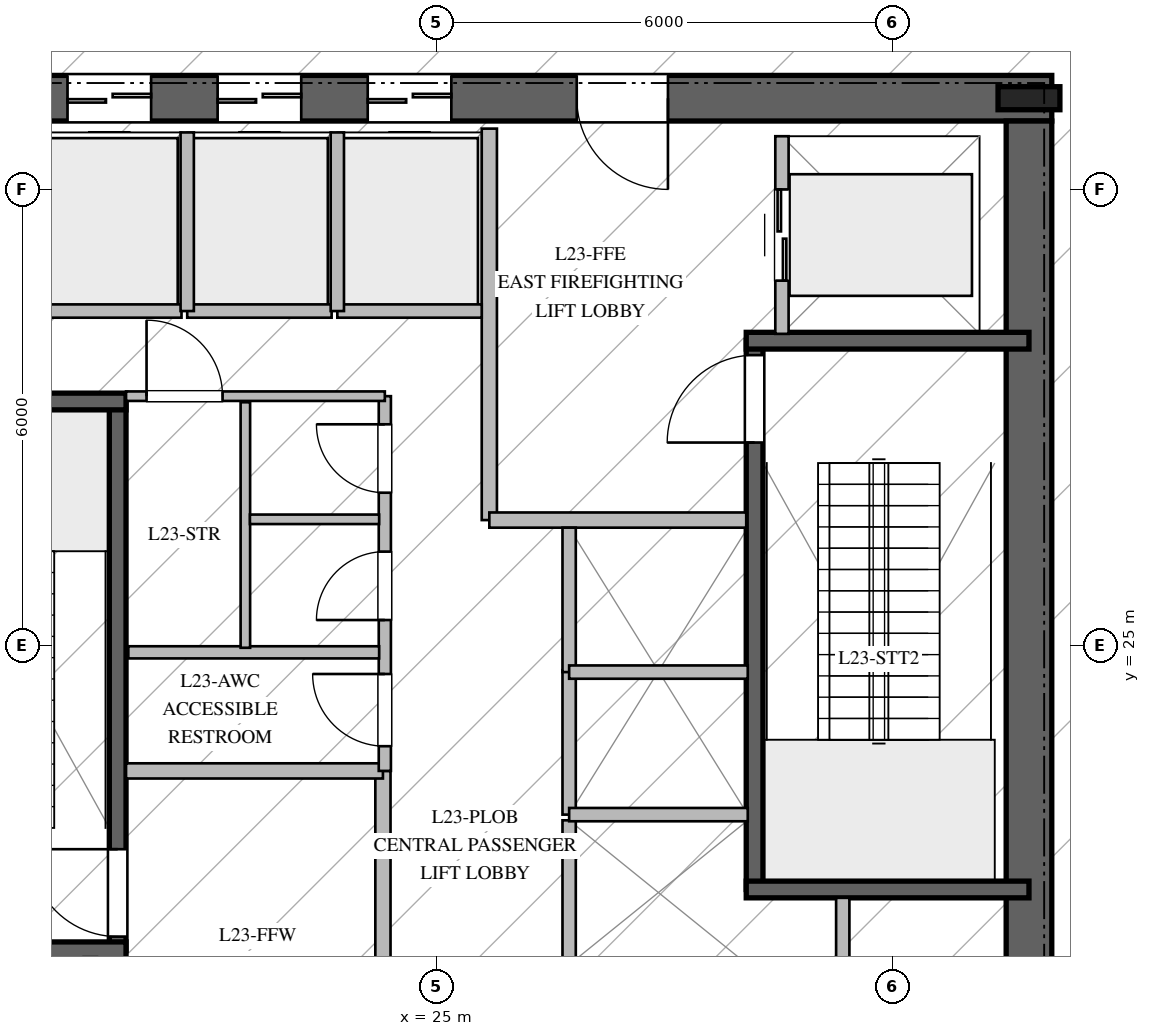
"""IFC4 building model, lengths in metres.
Left out: names, types, materials, properties, quantities, classifications, styles, units other than length and angle.
Written with IfcOpenShell. Run it as: python <this file> out.ifc"""

import sys

from ifc_helpers import new_model, si_unit, direction, frame, frame_2d, origin, origin_2d, place, context, subcontext, project, spatial, rectangle, i_section, extrude, element, fill, save


model = new_model("IFC4")
c1 = context("Model", 3, precision=1e-05, world=origin(), true_north=direction((0.0, 1.0)))
c2 = subcontext(c1, "Body", "Model", "MODEL_VIEW")
j1 = project(units=[si_unit("LENGTHUNIT", "METRE"), si_unit("PLANEANGLEUNIT", "RADIAN")], contexts=[c1])
p1 = place(None, origin())
s1 = spatial("IfcSite", under=j1, at=p1, CompositionType="ELEMENT")
p2 = place(p1, origin())
s2 = spatial("IfcBuilding", under=s1, at=p2, CompositionType="ELEMENT")
p3 = place(p2, frame((0.0, 0.0, 97.4)))
s3 = spatial("IfcBuildingStorey", under=s2, at=p3, CompositionType="ELEMENT", Elevation=97.4)
p4 = place(p3, frame((33.1, 32.2, 0.0), z_axis=(0.0, 0.0, 1.0), x_axis=(-1.0, 0.0, 0.0)))
e1 = element("IfcWall", 1, at=p4, inside=s3, PredefinedType="SHEAR", context=c2, shape_type="SweptSolid", body=[
    extrude(rectangle(XDim=16.2, YDim=0.6, at=frame_2d((8.1, 0.0))), origin(), (0.0, 0.0, 1.0), 4.76),
])
p5 = place(p4, frame((5.05, 0.0, 0.0)))
e2 = element("IfcOpeningElement", 2, at=p5, cuts=e1, PredefinedType="OPENING", context=c2, shape_type="SweptSolid", body=[
    extrude(rectangle(XDim=1.2, YDim=2.25, at=frame_2d((0.6, 1.125))), frame((0.0, 0.31, 0.0), z_axis=(0.0, -1.0, 0.0), x_axis=(1.0, 0.0, 0.0)), (0.0, 0.0, 1.0), 0.62),
])
p6 = place(p4, frame((11.85, 0.0, 0.0)))
e3 = element("IfcOpeningElement", 3, at=p6, cuts=e1, PredefinedType="OPENING", context=c2, shape_type="SweptSolid", body=[
    extrude(rectangle(XDim=1.1, YDim=2.2, at=frame_2d((0.55, 1.1))), frame((0.0, 0.31, 0.0), z_axis=(0.0, -1.0, 0.0), x_axis=(1.0, 0.0, 0.0)), (0.0, 0.0, 1.0), 0.62),
])
p7 = place(p4, frame((9.875, 0.0, 0.0)))
e4 = element("IfcOpeningElement", 4, at=p7, cuts=e1, PredefinedType="OPENING", context=c2, shape_type="SweptSolid", body=[
    extrude(rectangle(XDim=1.1, YDim=2.2, at=frame_2d((0.55, 1.1))), frame((0.0, 0.31, 0.0), z_axis=(0.0, -1.0, 0.0), x_axis=(1.0, 0.0, 0.0)), (0.0, 0.0, 1.0), 0.62),
])
p8 = place(p4, frame((7.9, 0.0, 0.0)))
e5 = element("IfcOpeningElement", 5, at=p8, cuts=e1, PredefinedType="OPENING", context=c2, shape_type="SweptSolid", body=[
    extrude(rectangle(XDim=1.1, YDim=2.2, at=frame_2d((0.55, 1.1))), frame((0.0, 0.31, 0.0), z_axis=(0.0, -1.0, 0.0), x_axis=(1.0, 0.0, 0.0)), (0.0, 0.0, 1.0), 0.62),
])
p9 = place(p3, frame((32.8, 18.1, 0.0), z_axis=(0.0, 0.0, 1.0), x_axis=(0.0, 1.0, 0.0)))
e6 = element("IfcWall", 6, at=p9, inside=s3, PredefinedType="SHEAR", context=c2, shape_type="SweptSolid", body=[
    extrude(rectangle(XDim=13.8, YDim=0.6, at=frame_2d((6.9, 0.0))), origin(), (0.0, 0.0, 1.0), 4.76),
])
p10 = place(p3, frame((32.8, 32.2, 0.0), z_axis=(0.0, 0.0, 1.0), x_axis=(1.0, 0.0, 0.0)))
e7 = element("IfcColumn", 7, at=p10, inside=s3, PredefinedType="COLUMN", context=c2, shape_type="SweptSolid", body=[
    extrude(i_section(OverallWidth=0.303, OverallDepth=0.814, WebThickness=0.021, FlangeThickness=0.04, at=origin_2d()), origin(), (0.0, 0.0, 1.0), 5.0),
])
p11 = place(p3, frame((20.81, 20.99, 0.0), z_axis=(0.0, 0.0, 1.0), x_axis=(0.0, 1.0, 0.0)))
e8 = element("IfcWall", 8, at=p11, inside=s3, PredefinedType="SOLIDWALL", context=c2, shape_type="SweptSolid", body=[
    extrude(rectangle(XDim=7.22, YDim=0.22, at=frame_2d((3.61, 0.0))), origin(), (0.0, 0.0, 1.0), 4.76),
])
p12 = place(p11, frame((0.18, 0.0, 0.0)))
e9 = element("IfcOpeningElement", 9, at=p12, cuts=e8, PredefinedType="OPENING", context=c2, shape_type="SweptSolid", body=[
    extrude(rectangle(XDim=1.15, YDim=2.2, at=frame_2d((0.575, 1.1))), frame((0.0, 0.12, 0.0), z_axis=(0.0, -1.0, 0.0), x_axis=(1.0, 0.0, 0.0)), (0.0, 0.0, 1.0), 0.24),
])
for number, where, z_axis, x_axis in (
    (10, (17.2, 20.99, 0.0), (0.0, 0.0, 1.0), (1.0, 0.0, 0.0)),
    (11, (17.2, 28.21, 0.0), (0.0, 0.0, 1.0), (1.0, 0.0, 0.0)),
):
    element("IfcWall", number, at=place(p3, frame(where, z_axis=z_axis, x_axis=x_axis)), inside=s3, PredefinedType="SOLIDWALL", context=c2, shape_type="SweptSolid", body=[
        extrude(rectangle(XDim=3.72, YDim=0.22, at=frame_2d((1.86, 0.0))), origin(), (0.0, 0.0, 1.0), 4.76),
    ])
p13 = place(p3, frame((29.19, 21.79, 0.0), z_axis=(0.0, 0.0, 1.0), x_axis=(0.0, 1.0, 0.0)))
e12 = element("IfcWall", 12, at=p13, inside=s3, PredefinedType="SOLIDWALL", context=c2, shape_type="SweptSolid", body=[
    extrude(rectangle(XDim=7.22, YDim=0.22, at=frame_2d((3.61, 0.0))), origin(), (0.0, 0.0, 1.0), 4.76),
])
p14 = place(p13, frame((5.88, 0.0, 0.0)))
e13 = element("IfcOpeningElement", 13, at=p14, cuts=e12, PredefinedType="OPENING", context=c2, shape_type="SweptSolid", body=[
    extrude(rectangle(XDim=1.15, YDim=2.2, at=frame_2d((0.575, 1.1))), frame((0.0, 0.12, 0.0), z_axis=(0.0, -1.0, 0.0), x_axis=(1.0, 0.0, 0.0)), (0.0, 0.0, 1.0), 0.24),
])
for number, where, z_axis, x_axis in (
    (14, (29.08, 21.79, 0.0), (0.0, 0.0, 1.0), (1.0, 0.0, 0.0)),
    (15, (29.08, 29.01, 0.0), (0.0, 0.0, 1.0), (1.0, 0.0, 0.0)),
):
    element("IfcWall", number, at=place(p3, frame(where, z_axis=z_axis, x_axis=x_axis)), inside=s3, PredefinedType="SOLIDWALL", context=c2, shape_type="SweptSolid", body=[
        extrude(rectangle(XDim=3.72, YDim=0.22, at=frame_2d((1.86, 0.0))), origin(), (0.0, 0.0, 1.0), 4.76),
    ])
p15 = place(p3, frame((24.3, 18.2, 0.0), z_axis=(0.0, 0.0, 1.0), x_axis=(0.0, 1.0, 0.0)))
e16 = element("IfcWall", 16, at=p15, inside=s3, PredefinedType="PARTITIONING", context=c2, shape_type="SweptSolid", body=[
    extrude(rectangle(XDim=5.15, YDim=0.2, at=frame_2d((2.575, 0.0))), origin(), (0.0, 0.0, 1.0), 4.76),
])
p16 = place(p3, frame((20.92, 23.35, 0.0), z_axis=(0.0, 0.0, 1.0), x_axis=(1.0, 0.0, 0.0)))
e17 = element("IfcWall", 17, at=p16, inside=s3, PredefinedType="PARTITIONING", context=c2, shape_type="SweptSolid", body=[
    extrude(rectangle(XDim=3.38, YDim=0.2, at=frame_2d((1.69, 0.0))), origin(), (0.0, 0.0, 1.0), 4.76),
])
p17 = place(p3, frame((25.7, 26.65, 0.0), z_axis=(0.0, 0.0, 1.0), x_axis=(0.0, 1.0, 0.0)))
e18 = element("IfcWall", 18, at=p17, inside=s3, PredefinedType="PARTITIONING", context=c2, shape_type="SweptSolid", body=[
    extrude(rectangle(XDim=5.15, YDim=0.2, at=frame_2d((2.575, 0.0))), origin(), (0.0, 0.0, 1.0), 4.76),
])
p18 = place(p3, frame((25.7, 26.65, 0.0), z_axis=(0.0, 0.0, 1.0), x_axis=(1.0, 0.0, 0.0)))
e19 = element("IfcWall", 19, at=p18, inside=s3, PredefinedType="PARTITIONING", context=c2, shape_type="SweptSolid", body=[
    extrude(rectangle(XDim=3.38, YDim=0.2, at=frame_2d((1.69, 0.0))), origin(), (0.0, 0.0, 1.0), 4.76),
])
p19 = place(p3, frame((24.325, 23.35, 0.0), z_axis=(0.0, 0.0, 1.0), x_axis=(0.0, 1.0, 0.0)))
e20 = element("IfcWall", 20, at=p19, inside=s3, PredefinedType="PLUMBINGWALL", context=c2, shape_type="SweptSolid", body=[
    extrude(rectangle(XDim=4.93, YDim=0.16, at=frame_2d((2.465, 0.0))), origin(), (0.0, 0.0, 1.0), 4.76),
])
p20 = place(p19, frame((0.325, 0.0, 0.0)))
e21 = element("IfcOpeningElement", 21, at=p20, cuts=e20, PredefinedType="OPENING", context=c2, shape_type="SweptSolid", body=[
    extrude(rectangle(XDim=0.95, YDim=2.1, at=frame_2d((0.475, 1.05))), frame((0.0, 0.09, 0.0), z_axis=(0.0, -1.0, 0.0), x_axis=(1.0, 0.0, 0.0)), (0.0, 0.0, 1.0), 0.18),
])
p21 = place(p19, frame((1.985, 0.0, 0.0)))
e22 = element("IfcOpeningElement", 22, at=p21, cuts=e20, PredefinedType="OPENING", context=c2, shape_type="SweptSolid", body=[
    extrude(rectangle(XDim=0.9, YDim=2.1, at=frame_2d((0.45, 1.05))), frame((0.0, 0.09, 0.0), z_axis=(0.0, -1.0, 0.0), x_axis=(1.0, 0.0, 0.0)), (0.0, 0.0, 1.0), 0.18),
])
p22 = place(p19, frame((3.66, 0.0, 0.0)))
e23 = element("IfcOpeningElement", 23, at=p22, cuts=e20, PredefinedType="OPENING", context=c2, shape_type="SweptSolid", body=[
    extrude(rectangle(XDim=0.9, YDim=2.1, at=frame_2d((0.45, 1.05))), frame((0.0, 0.09, 0.0), z_axis=(0.0, -1.0, 0.0), x_axis=(1.0, 0.0, 0.0)), (0.0, 0.0, 1.0), 0.18),
])
p23 = place(p3, frame((20.92, 28.28, 0.0), z_axis=(0.0, 0.0, 1.0), x_axis=(1.0, 0.0, 0.0)))
e24 = element("IfcWall", 24, at=p23, inside=s3, PredefinedType="PARTITIONING", context=c2, shape_type="SweptSolid", body=[
    extrude(rectangle(XDim=3.405, YDim=0.125, at=frame_2d((1.703, 0.0))), origin(), (0.0, 0.0, 1.0), 4.76),
])
p24 = place(p23, frame((0.27, 0.0, 0.0)))
e25 = element("IfcOpeningElement", 25, at=p24, cuts=e24, PredefinedType="OPENING", context=c2, shape_type="SweptSolid", body=[
    extrude(rectangle(XDim=1.0, YDim=2.15, at=frame_2d((0.5, 1.075))), frame((0.0, 0.073, 0.0), z_axis=(0.0, -1.0, 0.0), x_axis=(1.0, 0.0, 0.0)), (0.0, 0.0, 1.0), 0.145),
])
p25 = place(p3, frame((20.95, 24.91, 0.0), z_axis=(0.0, 0.0, 1.0), x_axis=(1.0, 0.0, 0.0)))
e26 = element("IfcWall", 26, at=p25, inside=s3, PredefinedType="PLUMBINGWALL", context=c2, shape_type="SweptSolid", body=[
    extrude(rectangle(XDim=3.3, YDim=0.16, at=frame_2d((1.65, 0.0))), origin(), (0.0, 0.0, 1.0), 4.76),
])
p26 = place(p3, frame((22.49, 24.97, 0.0), z_axis=(0.0, 0.0, 1.0), x_axis=(0.0, 1.0, 0.0)))
e27 = element("IfcWall", 27, at=p26, inside=s3, PredefinedType="PARTITIONING", context=c2, shape_type="SweptSolid", body=[
    extrude(rectangle(XDim=3.23, YDim=0.125, at=frame_2d((1.615, 0.0))), origin(), (0.0, 0.0, 1.0), 4.76),
])
p27 = place(p3, frame((22.55, 26.66, 0.0), z_axis=(0.0, 0.0, 1.0), x_axis=(1.0, 0.0, 0.0)))
e28 = element("IfcWall", 28, at=p27, inside=s3, PredefinedType="PARTITIONING", context=c2, shape_type="SweptSolid", body=[
    extrude(rectangle(XDim=1.7, YDim=0.125, at=frame_2d((0.85, 0.0))), origin(), (0.0, 0.0, 1.0), 4.76),
])
p28 = place(p3, frame((30.35, 18.2, 0.0), z_axis=(0.0, 0.0, 1.0), x_axis=(0.0, 1.0, 0.0)))
e29 = element("IfcWall", 29, at=p28, inside=s3, PredefinedType="PARTITIONING", context=c2, shape_type="SweptSolid", body=[
    extrude(rectangle(XDim=3.48, YDim=0.175, at=frame_2d((1.74, 0.0))), origin(), (0.0, 0.0, 1.0), 4.76),
])
for number, where, z_axis, x_axis in (
    (30, (19.75, 29.4, 0.0), (0.0, 0.0, 1.0), (1.0, 0.0, 0.0)),
    (31, (21.725, 29.4, 0.0), (0.0, 0.0, 1.0), (1.0, 0.0, 0.0)),
):
    element("IfcWall", number, at=place(p3, frame(where, z_axis=z_axis, x_axis=x_axis)), inside=s3, PredefinedType="PARTITIONING", context=c2, shape_type="SweptSolid", body=[
        extrude(rectangle(XDim=1.9, YDim=0.175, at=frame_2d((0.95, 0.0))), origin(), (0.0, 0.0, 1.0), 4.76),
    ])
p29 = place(p3, frame((21.725, 29.4, 0.0), z_axis=(0.0, 0.0, 1.0), x_axis=(0.0, 1.0, 0.0)))
e32 = element("IfcWall", 32, at=p29, inside=s3, PredefinedType="PARTITIONING", context=c2, shape_type="SweptSolid", body=[
    extrude(rectangle(XDim=2.35, YDim=0.175, at=frame_2d((1.175, 0.0))), origin(), (0.0, 0.0, 1.0), 4.76),
])
p30 = place(p3, frame((23.7, 29.4, 0.0), z_axis=(0.0, 0.0, 1.0), x_axis=(1.0, 0.0, 0.0)))
e33 = element("IfcWall", 33, at=p30, inside=s3, PredefinedType="PARTITIONING", context=c2, shape_type="SweptSolid", body=[
    extrude(rectangle(XDim=1.9, YDim=0.175, at=frame_2d((0.95, 0.0))), origin(), (0.0, 0.0, 1.0), 4.76),
])
p31 = place(p3, frame((23.7, 29.4, 0.0), z_axis=(0.0, 0.0, 1.0), x_axis=(0.0, 1.0, 0.0)))
e34 = element("IfcWall", 34, at=p31, inside=s3, PredefinedType="PARTITIONING", context=c2, shape_type="SweptSolid", body=[
    extrude(rectangle(XDim=2.35, YDim=0.175, at=frame_2d((1.175, 0.0))), origin(), (0.0, 0.0, 1.0), 4.76),
])
p32 = place(p3, frame((26.75, 20.8, 0.0), z_axis=(0.0, 0.0, 1.0), x_axis=(0.0, 1.0, 0.0)))
e35 = element("IfcWall", 35, at=p32, inside=s3, PredefinedType="PARTITIONING", context=c2, shape_type="SweptSolid", body=[
    extrude(rectangle(XDim=1.9, YDim=0.175, at=frame_2d((0.95, 0.0))), origin(), (0.0, 0.0, 1.0), 4.76),
])
p33 = place(p3, frame((26.75, 22.775, 0.0), z_axis=(0.0, 0.0, 1.0), x_axis=(0.0, 1.0, 0.0)))
e36 = element("IfcWall", 36, at=p33, inside=s3, PredefinedType="PARTITIONING", context=c2, shape_type="SweptSolid", body=[
    extrude(rectangle(XDim=1.9, YDim=0.175, at=frame_2d((0.95, 0.0))), origin(), (0.0, 0.0, 1.0), 4.76),
])
p34 = place(p3, frame((26.75, 22.775, 0.0), z_axis=(0.0, 0.0, 1.0), x_axis=(1.0, 0.0, 0.0)))
e37 = element("IfcWall", 37, at=p34, inside=s3, PredefinedType="PARTITIONING", context=c2, shape_type="SweptSolid", body=[
    extrude(rectangle(XDim=2.35, YDim=0.175, at=frame_2d((1.175, 0.0))), origin(), (0.0, 0.0, 1.0), 4.76),
])
p35 = place(p3, frame((26.75, 24.65, 0.0), z_axis=(0.0, 0.0, 1.0), x_axis=(0.0, 1.0, 0.0)))
e38 = element("IfcWall", 38, at=p35, inside=s3, PredefinedType="PARTITIONING", context=c2, shape_type="SweptSolid", body=[
    extrude(rectangle(XDim=1.9, YDim=0.175, at=frame_2d((0.95, 0.0))), origin(), (0.0, 0.0, 1.0), 4.76),
])
p36 = place(p3, frame((26.75, 24.65, 0.0), z_axis=(0.0, 0.0, 1.0), x_axis=(1.0, 0.0, 0.0)))
e39 = element("IfcWall", 39, at=p36, inside=s3, PredefinedType="PARTITIONING", context=c2, shape_type="SweptSolid", body=[
    extrude(rectangle(XDim=2.35, YDim=0.175, at=frame_2d((1.175, 0.0))), origin(), (0.0, 0.0, 1.0), 4.76),
])
p37 = place(p3, frame((29.55, 29.1, 0.0), z_axis=(0.0, 0.0, 1.0), x_axis=(0.0, 1.0, 0.0)))
e40 = element("IfcWall", 40, at=p37, inside=s3, PredefinedType="PARTITIONING", context=c2, shape_type="SweptSolid", body=[
    extrude(rectangle(XDim=2.6, YDim=0.175, at=frame_2d((1.3, 0.0))), origin(), (0.0, 0.0, 1.0), 4.76),
])
p38 = place(p37, frame((0.7, 0.0, 0.0)))
e41 = element("IfcOpeningElement", 41, at=p38, cuts=e40, PredefinedType="OPENING", context=c2, shape_type="SweptSolid", body=[
    extrude(rectangle(XDim=1.2, YDim=2.2, at=frame_2d((0.6, 1.1))), frame((0.0, 0.098, 0.0), z_axis=(0.0, -1.0, 0.0), x_axis=(1.0, 0.0, 0.0)), (0.0, 0.0, 1.0), 0.195),
])
p39 = place(p12, origin())
e42 = element("IfcDoor", 42, at=p39, inside=s3, OperationType="SINGLE_SWING_RIGHT", PredefinedType="DOOR", context=c2, shape_type="SweptSolid", body=[
    extrude(rectangle(XDim=1.15, YDim=2.2, at=frame_2d((0.575, 1.1))), frame((0.0, 0.025, 0.0), z_axis=(0.0, -1.0, 0.0), x_axis=(1.0, 0.0, 0.0)), (0.0, 0.0, 1.0), 0.05),
])
fill(e9, e42)
p40 = place(p14, origin())
e43 = element("IfcDoor", 43, at=p40, inside=s3, OperationType="SINGLE_SWING_LEFT", PredefinedType="DOOR", context=c2, shape_type="SweptSolid", body=[
    extrude(rectangle(XDim=1.15, YDim=2.2, at=frame_2d((0.575, 1.1))), frame((0.0, 0.025, 0.0), z_axis=(0.0, -1.0, 0.0), x_axis=(1.0, 0.0, 0.0)), (0.0, 0.0, 1.0), 0.05),
])
fill(e13, e43)
p41 = place(p5, origin())
e44 = element("IfcDoor", 44, at=p41, inside=s3, OperationType="SINGLE_SWING_LEFT", PredefinedType="DOOR", context=c2, shape_type="SweptSolid", body=[
    extrude(rectangle(XDim=1.2, YDim=2.25, at=frame_2d((0.6, 1.125))), frame((0.0, 0.025, 0.0), z_axis=(0.0, -1.0, 0.0), x_axis=(1.0, 0.0, 0.0)), (0.0, 0.0, 1.0), 0.05),
])
fill(e2, e44)
p42 = place(p20, origin())
e45 = element("IfcDoor", 45, at=p42, inside=s3, OperationType="SINGLE_SWING_RIGHT", PredefinedType="DOOR", context=c2, shape_type="SweptSolid", body=[
    extrude(rectangle(XDim=0.95, YDim=2.1, at=frame_2d((0.475, 1.05))), frame((0.0, 0.025, 0.0), z_axis=(0.0, -1.0, 0.0), x_axis=(1.0, 0.0, 0.0)), (0.0, 0.0, 1.0), 0.05),
])
fill(e21, e45)
p43 = place(p21, origin())
e46 = element("IfcDoor", 46, at=p43, inside=s3, OperationType="SINGLE_SWING_LEFT", PredefinedType="DOOR", context=c2, shape_type="SweptSolid", body=[
    extrude(rectangle(XDim=0.9, YDim=2.1, at=frame_2d((0.45, 1.05))), frame((0.0, 0.025, 0.0), z_axis=(0.0, -1.0, 0.0), x_axis=(1.0, 0.0, 0.0)), (0.0, 0.0, 1.0), 0.05),
])
fill(e22, e46)
p44 = place(p22, origin())
e47 = element("IfcDoor", 47, at=p44, inside=s3, OperationType="SINGLE_SWING_RIGHT", PredefinedType="DOOR", context=c2, shape_type="SweptSolid", body=[
    extrude(rectangle(XDim=0.9, YDim=2.1, at=frame_2d((0.45, 1.05))), frame((0.0, 0.025, 0.0), z_axis=(0.0, -1.0, 0.0), x_axis=(1.0, 0.0, 0.0)), (0.0, 0.0, 1.0), 0.05),
])
fill(e23, e47)
p45 = place(p24, origin())
e48 = element("IfcDoor", 48, at=p45, inside=s3, OperationType="SINGLE_SWING_LEFT", PredefinedType="DOOR", context=c2, shape_type="SweptSolid", body=[
    extrude(rectangle(XDim=1.0, YDim=2.15, at=frame_2d((0.5, 1.075))), frame((0.0, 0.025, 0.0), z_axis=(0.0, -1.0, 0.0), x_axis=(1.0, 0.0, 0.0)), (0.0, 0.0, 1.0), 0.05),
])
fill(e25, e48)
p46 = place(p6, origin())
e49 = element("IfcDoor", 49, at=p46, inside=s3, OperationType="DOUBLE_DOOR_SLIDING", PredefinedType="DOOR", context=c2, shape_type="SweptSolid", body=[
    extrude(rectangle(XDim=1.1, YDim=2.2, at=frame_2d((0.55, 1.1))), frame((0.0, 0.025, 0.0), z_axis=(0.0, -1.0, 0.0), x_axis=(1.0, 0.0, 0.0)), (0.0, 0.0, 1.0), 0.05),
])
fill(e3, e49)
p47 = place(p7, origin())
e50 = element("IfcDoor", 50, at=p47, inside=s3, OperationType="DOUBLE_DOOR_SLIDING", PredefinedType="DOOR", context=c2, shape_type="SweptSolid", body=[
    extrude(rectangle(XDim=1.1, YDim=2.2, at=frame_2d((0.55, 1.1))), frame((0.0, 0.025, 0.0), z_axis=(0.0, -1.0, 0.0), x_axis=(1.0, 0.0, 0.0)), (0.0, 0.0, 1.0), 0.05),
])
fill(e4, e50)
p48 = place(p8, origin())
e51 = element("IfcDoor", 51, at=p48, inside=s3, OperationType="DOUBLE_DOOR_SLIDING", PredefinedType="DOOR", context=c2, shape_type="SweptSolid", body=[
    extrude(rectangle(XDim=1.1, YDim=2.2, at=frame_2d((0.55, 1.1))), frame((0.0, 0.025, 0.0), z_axis=(0.0, -1.0, 0.0), x_axis=(1.0, 0.0, 0.0)), (0.0, 0.0, 1.0), 0.05),
])
fill(e5, e51)
p49 = place(p38, origin())
e52 = element("IfcDoor", 52, at=p49, inside=s3, OperationType="DOUBLE_DOOR_SLIDING", PredefinedType="DOOR", context=c2, shape_type="SweptSolid", body=[
    extrude(rectangle(XDim=1.2, YDim=2.2, at=frame_2d((0.6, 1.1))), frame((0.0, 0.025, 0.0), z_axis=(0.0, -1.0, 0.0), x_axis=(1.0, 0.0, 0.0)), (0.0, 0.0, 1.0), 0.05),
])
fill(e41, e52)
save(model, sys.argv[1])
